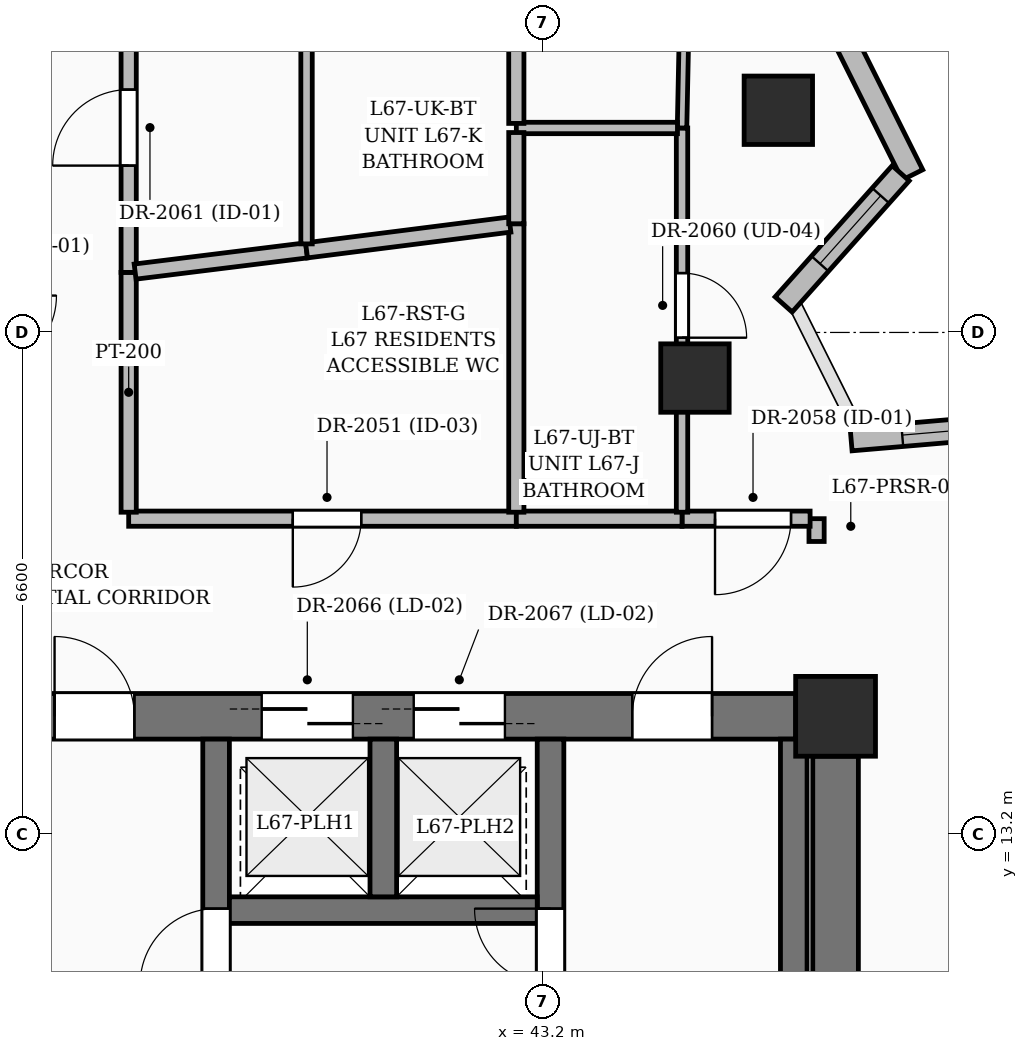
"""IFC4 building model, lengths in metres.
Left out: names, types, materials, properties, quantities, classifications, styles, units other than length and angle.
Written with IfcOpenShell. Run it as: python <this file> out.ifc"""

import sys

from ifc_helpers import new_model, si_unit, direction, frame, frame_2d, origin, origin_2d, place, context, subcontext, project, spatial, rectangle, extrude, element, fill, save


model = new_model("IFC4")
c1 = context("Model", 3, precision=1e-05, world=origin(), true_north=direction((0.0, 1.0)))
c2 = subcontext(c1, "Body", "Model", "MODEL_VIEW")
j1 = project(units=[si_unit("LENGTHUNIT", "METRE"), si_unit("PLANEANGLEUNIT", "RADIAN")], contexts=[c1])
p1 = place(None, origin())
s1 = spatial("IfcSite", under=j1, at=p1, CompositionType="ELEMENT")
p2 = place(p1, origin())
s2 = spatial("IfcBuilding", under=s1, at=p2, CompositionType="ELEMENT")
p3 = place(p2, frame((0.0, 0.0, 259.5)))
s3 = spatial("IfcBuildingStorey", under=s2, at=p3, CompositionType="ELEMENT", Elevation=259.5)
p4 = place(p3, frame((47.05, 14.75, 0.0), z_axis=(0.0, 0.0, 1.0), x_axis=(1.0, 0.0, 0.0)))
e1 = element("IfcColumn", 1, at=p4, inside=s3, PredefinedType="COLUMN", context=c2, shape_type="SweptSolid", body=[
    extrude(rectangle(XDim=1.05, YDim=1.05, at=origin_2d()), origin(), (0.0, 0.0, 1.0), 3.75),
])
p5 = place(p3, frame((45.2, 19.2, 0.0), z_axis=(0.0, 0.0, 1.0), x_axis=(1.0, 0.0, 0.0)))
e2 = element("IfcColumn", 2, at=p5, inside=s3, PredefinedType="COLUMN", context=c2, shape_type="SweptSolid", body=[
    extrude(rectangle(XDim=0.9, YDim=0.9, at=origin_2d()), origin(), (0.0, 0.0, 1.0), 3.75),
])
p6 = place(p3, frame((35.675, 14.75, 0.0), z_axis=(0.0, 0.0, 1.0), x_axis=(1.0, 0.0, 0.0)))
e3 = element("IfcWall", 3, at=p6, inside=s3, PredefinedType="SHEAR", context=c2, shape_type="SweptSolid", body=[
    extrude(rectangle(XDim=10.85, YDim=0.6, at=frame_2d((5.425, 0.0))), origin(), (0.0, 0.0, 1.0), 3.75),
])
p7 = place(p6, frame((1.1, 0.0, 0.0)))
e4 = element("IfcOpeningElement", 4, at=p7, cuts=e3, PredefinedType="OPENING", context=c2, shape_type="SweptSolid", body=[
    extrude(rectangle(XDim=1.05, YDim=2.15, at=frame_2d((0.525, 1.075))), frame((0.0, 0.31, 0.0), z_axis=(0.0, -1.0, 0.0), x_axis=(1.0, 0.0, 0.0)), (0.0, 0.0, 1.0), 0.62),
])
p8 = place(p6, frame((8.7, 0.0, 0.0)))
e5 = element("IfcOpeningElement", 5, at=p8, cuts=e3, PredefinedType="OPENING", context=c2, shape_type="SweptSolid", body=[
    extrude(rectangle(XDim=1.05, YDim=2.15, at=frame_2d((0.525, 1.075))), frame((0.0, 0.31, 0.0), z_axis=(0.0, -1.0, 0.0), x_axis=(1.0, 0.0, 0.0)), (0.0, 0.0, 1.0), 0.62),
])
p9 = place(p6, frame((3.825, 0.0, 0.0)))
e6 = element("IfcOpeningElement", 6, at=p9, cuts=e3, PredefinedType="OPENING", context=c2, shape_type="SweptSolid", body=[
    extrude(rectangle(XDim=1.2, YDim=2.2, at=frame_2d((0.6, 1.1))), frame((0.0, 0.31, 0.0), z_axis=(0.0, -1.0, 0.0), x_axis=(1.0, 0.0, 0.0)), (0.0, 0.0, 1.0), 0.62),
])
p10 = place(p6, frame((5.825, 0.0, 0.0)))
e7 = element("IfcOpeningElement", 7, at=p10, cuts=e3, PredefinedType="OPENING", context=c2, shape_type="SweptSolid", body=[
    extrude(rectangle(XDim=1.2, YDim=2.2, at=frame_2d((0.6, 1.1))), frame((0.0, 0.31, 0.0), z_axis=(0.0, -1.0, 0.0), x_axis=(1.0, 0.0, 0.0)), (0.0, 0.0, 1.0), 0.62),
])
p11 = place(p3, frame((47.05, 5.075, 0.0), z_axis=(0.0, 0.0, 1.0), x_axis=(0.0, 1.0, 0.0)))
e8 = element("IfcWall", 8, at=p11, inside=s3, PredefinedType="SHEAR", context=c2, shape_type="SweptSolid", body=[
    extrude(rectangle(XDim=9.15, YDim=0.6, at=frame_2d((4.575, 0.0))), origin(), (0.0, 0.0, 1.0), 3.75),
])
p12 = place(p3, frame((38.9, 5.2, 0.0), z_axis=(0.0, 0.0, 1.0), x_axis=(0.0, 1.0, 0.0)))
e9 = element("IfcWall", 9, at=p12, inside=s3, PredefinedType="SOLIDWALL", context=c2, shape_type="SweptSolid", body=[
    extrude(rectangle(XDim=9.25, YDim=0.35, at=frame_2d((4.625, 0.0))), origin(), (0.0, 0.0, 1.0), 3.75),
])
p13 = place(p12, frame((6.02, 0.0, 0.0)))
e10 = element("IfcOpeningElement", 10, at=p13, cuts=e9, PredefinedType="OPENING", context=c2, shape_type="SweptSolid", body=[
    extrude(rectangle(XDim=1.0, YDim=2.15, at=frame_2d((0.5, 1.075))), frame((0.0, 0.185, 0.0), z_axis=(0.0, -1.0, 0.0), x_axis=(1.0, 0.0, 0.0)), (0.0, 0.0, 1.0), 0.37),
])
p14 = place(p3, frame((43.3, 5.2, 0.0), z_axis=(0.0, 0.0, 1.0), x_axis=(0.0, 1.0, 0.0)))
e11 = element("IfcWall", 11, at=p14, inside=s3, PredefinedType="SOLIDWALL", context=c2, shape_type="SweptSolid", body=[
    extrude(rectangle(XDim=9.25, YDim=0.35, at=frame_2d((4.625, 0.0))), origin(), (0.0, 0.0, 1.0), 3.75),
])
p15 = place(p14, frame((6.02, 0.0, 0.0)))
e12 = element("IfcOpeningElement", 12, at=p15, cuts=e11, PredefinedType="OPENING", context=c2, shape_type="SweptSolid", body=[
    extrude(rectangle(XDim=1.0, YDim=2.15, at=frame_2d((0.5, 1.075))), frame((0.0, 0.185, 0.0), z_axis=(0.0, -1.0, 0.0), x_axis=(1.0, 0.0, 0.0)), (0.0, 0.0, 1.0), 0.37),
])
p16 = place(p3, frame((46.5, 5.2, 0.0), z_axis=(0.0, 0.0, 1.0), x_axis=(0.0, 1.0, 0.0)))
e13 = element("IfcWall", 13, at=p16, inside=s3, PredefinedType="SOLIDWALL", context=c2, shape_type="SweptSolid", body=[
    extrude(rectangle(XDim=9.25, YDim=0.35, at=frame_2d((4.625, 0.0))), origin(), (0.0, 0.0, 1.0), 3.75),
])
p17 = place(p3, frame((39.075, 12.2, 0.0), z_axis=(0.0, 0.0, 1.0), x_axis=(1.0, 0.0, 0.0)))
e14 = element("IfcWall", 14, at=p17, inside=s3, PredefinedType="SOLIDWALL", context=c2, shape_type="SweptSolid", body=[
    extrude(rectangle(XDim=4.05, YDim=0.35, at=frame_2d((2.025, 0.0))), origin(), (0.0, 0.0, 1.0), 3.75),
])
p18 = place(p3, frame((41.1, 12.375, 0.0), z_axis=(0.0, 0.0, 1.0), x_axis=(0.0, 1.0, 0.0)))
e15 = element("IfcWall", 15, at=p18, inside=s3, PredefinedType="SOLIDWALL", context=c2, shape_type="SweptSolid", body=[
    extrude(rectangle(XDim=2.075, YDim=0.35, at=frame_2d((1.038, 0.0))), origin(), (0.0, 0.0, 1.0), 3.75),
])
p19 = place(p3, frame((46.297, 22.723, 0.0), z_axis=(0.0, 0.0, 1.0), x_axis=(1.0, 0.0, 0.0)))
e16 = element("IfcColumn", 16, at=p19, inside=s3, PredefinedType="COLUMN", context=c2, shape_type="SweptSolid", body=[
    extrude(rectangle(XDim=0.9, YDim=0.9, at=origin_2d()), origin(), (0.0, 0.0, 1.0), 3.75),
])
p20 = place(p3, frame((44.695, 28.611, 0.0), z_axis=(0.0, 0.0, 1.0), x_axis=(0.447161731119, -0.894453121311, 0.0)))
e17 = element("IfcWall", 17, at=p20, inside=s3, PredefinedType="SOLIDWALL", context=c2, shape_type="SweptSolid", body=[
    extrude(rectangle(XDim=7.532, YDim=0.3, at=frame_2d((3.766, 0.0))), origin(), (0.0, 0.0, 1.0), 3.5),
])
p21 = place(p20, frame((3.775, 0.0, 0.6)))
e18 = element("IfcOpeningElement", 18, at=p21, cuts=e17, PredefinedType="OPENING", context=c2, shape_type="SweptSolid", body=[
    extrude(rectangle(XDim=1.5, YDim=2.1, at=frame_2d((0.75, 1.05))), frame((0.0, 0.16, 0.0), z_axis=(0.0, -1.0, 0.0), x_axis=(1.0, 0.0, 0.0)), (0.0, 0.0, 1.0), 0.32),
])
p22 = place(p3, frame((47.907, 21.895, 0.0), z_axis=(0.0, 0.0, 1.0), x_axis=(-0.665751463499, -0.746173564829, 0.0)))
e19 = element("IfcWall", 19, at=p22, inside=s3, PredefinedType="SOLIDWALL", context=c2, shape_type="SweptSolid", body=[
    extrude(rectangle(XDim=2.313, YDim=0.3, at=frame_2d((1.157, 0.0))), origin(), (0.0, 0.0, 1.0), 2.825),
])
p23 = place(p22, frame((0.395, 0.0, 0.8)))
e20 = element("IfcOpeningElement", 20, at=p23, cuts=e19, PredefinedType="OPENING", context=c2, shape_type="SweptSolid", body=[
    extrude(rectangle(XDim=1.2, YDim=1.8, at=frame_2d((0.6, 0.9))), frame((0.0, 0.16, 0.0), z_axis=(0.0, -1.0, 0.0), x_axis=(1.0, 0.0, 0.0)), (0.0, 0.0, 1.0), 0.32),
])
p24 = place(p3, frame((47.254, 18.392, 0.0), z_axis=(0.0, 0.0, 1.0), x_axis=(0.99637564352, 0.085062194895, 0.0)))
e21 = element("IfcWall", 21, at=p24, inside=s3, PredefinedType="SOLIDWALL", context=c2, shape_type="SweptSolid", body=[
    extrude(rectangle(XDim=2.595, YDim=0.3, at=frame_2d((1.297, 0.0))), origin(), (0.0, 0.0, 1.0), 2.825),
])
p25 = place(p24, frame((0.675, 0.0, 0.8)))
e22 = element("IfcOpeningElement", 22, at=p25, cuts=e21, PredefinedType="OPENING", context=c2, shape_type="SweptSolid", body=[
    extrude(rectangle(XDim=1.2, YDim=1.8, at=frame_2d((0.6, 0.9))), frame((0.0, 0.16, 0.0), z_axis=(0.0, -1.0, 0.0), x_axis=(1.0, 0.0, 0.0)), (0.0, 0.0, 1.0), 0.32),
])
p26 = place(p3, frame((42.85, 17.35, 0.0), z_axis=(0.0, 0.0, 1.0), x_axis=(-1.0, 0.0, 0.0)))
e23 = element("IfcWall", 23, at=p26, inside=s3, PredefinedType="PARTITIONING", context=c2, shape_type="SweptSolid", body=[
    extrude(rectangle(XDim=5.1, YDim=0.2, at=frame_2d((2.55, 0.0))), origin(), (0.0, 0.0, 1.0), 3.5),
])
p27 = place(p26, frame((2.041, 0.0, 0.0)))
e24 = element("IfcOpeningElement", 24, at=p27, cuts=e23, PredefinedType="OPENING", context=c2, shape_type="SweptSolid", body=[
    extrude(rectangle(XDim=0.9, YDim=2.1, at=frame_2d((0.45, 1.05))), frame((0.0, 0.11, 0.0), z_axis=(0.0, -1.0, 0.0), x_axis=(1.0, 0.0, 0.0)), (0.0, 0.0, 1.0), 0.22),
])
p28 = place(p3, frame((37.75, 17.435, 0.0), z_axis=(0.0, 0.0, 1.0), x_axis=(0.0, 1.0, 0.0)))
e25 = element("IfcWall", 25, at=p28, inside=s3, PredefinedType="PARTITIONING", context=c2, shape_type="SweptSolid", body=[
    extrude(rectangle(XDim=3.155, YDim=0.2, at=frame_2d((1.578, 0.0))), origin(), (0.0, 0.0, 1.0), 3.5),
])
p29 = place(p3, frame((46.8, 17.05, 0.0), z_axis=(0.0, 0.0, 1.0), x_axis=(0.0, 1.0, 0.0)))
e26 = element("IfcWall", 26, at=p29, inside=s3, PredefinedType="PARTITIONING", context=c2, shape_type="SweptSolid", body=[
    extrude(rectangle(XDim=0.3, YDim=0.2, at=frame_2d((0.15, 0.0))), origin(), (0.0, 0.0, 1.0), 3.5),
])
p30 = place(p3, frame((46.715, 17.35, 0.0), z_axis=(0.0, 0.0, 1.0), x_axis=(-1.0, 0.0, 0.0)))
e27 = element("IfcWall", 27, at=p30, inside=s3, PredefinedType="PARTITIONING", context=c2, shape_type="SweptSolid", body=[
    extrude(rectangle(XDim=1.685, YDim=0.2, at=frame_2d((0.843, 0.0))), origin(), (0.0, 0.0, 1.0), 2.685),
])
p31 = place(p30, frame((0.251, 0.0, 0.0)))
e28 = element("IfcOpeningElement", 28, at=p31, cuts=e27, PredefinedType="OPENING", context=c2, shape_type="SweptSolid", body=[
    extrude(rectangle(XDim=1.0, YDim=2.2, at=frame_2d((0.5, 1.1))), frame((0.0, 0.11, 0.0), z_axis=(0.0, -1.0, 0.0), x_axis=(1.0, 0.0, 0.0)), (0.0, 0.0, 1.0), 0.22),
])
p32 = place(p3, frame((45.03, 17.35, 0.0), z_axis=(0.0, 0.0, 1.0), x_axis=(-1.0, 0.0, 0.0)))
e29 = element("IfcWall", 29, at=p32, inside=s3, PredefinedType="PARTITIONING", context=c2, shape_type="SweptSolid", body=[
    extrude(rectangle(XDim=2.18, YDim=0.2, at=frame_2d((1.09, 0.0))), origin(), (0.0, 0.0, 1.0), 3.5),
])
p33 = place(p3, frame((37.75, 20.59, 0.0), z_axis=(0.0, 0.0, 1.0), x_axis=(0.0, 1.0, 0.0)))
e30 = element("IfcWall", 30, at=p33, inside=s3, PredefinedType="PARTITIONING", context=c2, shape_type="SweptSolid", body=[
    extrude(rectangle(XDim=3.765, YDim=0.2, at=frame_2d((1.882, 0.0))), origin(), (0.0, 0.0, 1.0), 3.5),
])
p34 = place(p33, frame((1.405, 0.0, 0.0)))
e31 = element("IfcOpeningElement", 31, at=p34, cuts=e30, PredefinedType="OPENING", context=c2, shape_type="SweptSolid", body=[
    extrude(rectangle(XDim=1.0, YDim=2.2, at=frame_2d((0.5, 1.1))), frame((0.0, 0.11, 0.0), z_axis=(0.0, -1.0, 0.0), x_axis=(1.0, 0.0, 0.0)), (0.0, 0.0, 1.0), 0.22),
])
p35 = place(p3, frame((42.85, 17.435, 0.0), z_axis=(0.0, 0.0, 1.0), x_axis=(0.0, 1.0, 0.0)))
e32 = element("IfcWall", 32, at=p35, inside=s3, PredefinedType="PARTITIONING", context=c2, shape_type="SweptSolid", body=[
    extrude(rectangle(XDim=3.795, YDim=0.2, at=frame_2d((1.897, 0.0))), origin(), (0.0, 0.0, 1.0), 3.5),
])
p36 = place(p3, frame((40.09, 20.88, 0.0), z_axis=(0.0, 0.0, 1.0), x_axis=(-0.992420982951, -0.122884468503, 0.0)))
e33 = element("IfcWall", 33, at=p36, inside=s3, PredefinedType="PARTITIONING", context=c2, shape_type="SweptSolid", body=[
    extrude(rectangle(XDim=2.273, YDim=0.2, at=frame_2d((1.136, 0.0))), origin(), (0.0, 0.0, 1.0), 3.5),
])
p37 = place(p3, frame((42.766, 21.219, 0.0), z_axis=(0.0, 0.0, 1.0), x_axis=(-0.992052034516, -0.12582829893, 0.0)))
e34 = element("IfcWall", 34, at=p37, inside=s3, PredefinedType="PARTITIONING", context=c2, shape_type="SweptSolid", body=[
    extrude(rectangle(XDim=2.697, YDim=0.2, at=frame_2d((1.349, 0.0))), origin(), (0.0, 0.0, 1.0), 3.5),
])
p38 = place(p3, frame((45.03, 22.49, 0.0), z_axis=(0.0, 0.0, 1.0), x_axis=(0.0, -1.0, 0.0)))
e35 = element("IfcWall", 35, at=p38, inside=s3, PredefinedType="PARTITIONING", context=c2, shape_type="SweptSolid", body=[
    extrude(rectangle(XDim=5.055, YDim=0.15, at=frame_2d((2.527, 0.0))), origin(), (0.0, 0.0, 1.0), 2.685),
])
p39 = place(p38, frame((1.909, 0.0, 0.0)))
e36 = element("IfcOpeningElement", 36, at=p39, cuts=e35, PredefinedType="OPENING", context=c2, shape_type="SweptSolid", body=[
    extrude(rectangle(XDim=0.85, YDim=2.1, at=frame_2d((0.425, 1.05))), frame((0.0, 0.085, 0.0), z_axis=(0.0, -1.0, 0.0), x_axis=(1.0, 0.0, 0.0)), (0.0, 0.0, 1.0), 0.17),
])
p40 = place(p3, frame((45.133, 27.469, 0.0), z_axis=(0.0, 0.0, 1.0), x_axis=(-0.020687931957, -0.999785981834, 0.0)))
e37 = element("IfcWall", 37, at=p40, inside=s3, PredefinedType="PARTITIONING", context=c2, shape_type="SweptSolid", body=[
    extrude(rectangle(XDim=4.98, YDim=0.125, at=frame_2d((2.49, 0.0))), origin(), (0.0, 0.0, 1.0), 2.82),
])
p41 = place(p40, frame((1.876, 0.0, 0.0)))
e38 = element("IfcOpeningElement", 38, at=p41, cuts=e37, PredefinedType="OPENING", context=c2, shape_type="SweptSolid", body=[
    extrude(rectangle(XDim=0.95, YDim=2.2, at=frame_2d((0.475, 1.1))), frame((0.0, 0.072, 0.0), z_axis=(0.0, -1.0, 0.0), x_axis=(1.0, 0.0, 0.0)), (0.0, 0.0, 1.0), 0.145),
])
p42 = place(p3, frame((44.97, 22.49, 0.0), z_axis=(0.0, 0.0, 1.0), x_axis=(-1.0, 0.0, 0.0)))
e39 = element("IfcWall", 39, at=p42, inside=s3, PredefinedType="PARTITIONING", context=c2, shape_type="SweptSolid", body=[
    extrude(rectangle(XDim=2.12, YDim=0.15, at=frame_2d((1.06, 0.0))), origin(), (0.0, 0.0, 1.0), 2.685),
])
p43 = place(p3, frame((42.85, 22.43, 0.0), z_axis=(0.0, 0.0, 1.0), x_axis=(0.0, -1.0, 0.0)))
e40 = element("IfcWall", 40, at=p43, inside=s3, PredefinedType="PARTITIONING", context=c2, shape_type="SweptSolid", body=[
    extrude(rectangle(XDim=1.2, YDim=0.2, at=frame_2d((0.6, 0.0))), origin(), (0.0, 0.0, 1.0), 3.5),
])
p44 = place(p3, frame((42.85, 27.48, 0.0), z_axis=(0.0, 0.0, 1.0), x_axis=(0.0, -1.0, 0.0)))
e41 = element("IfcWall", 41, at=p44, inside=s3, PredefinedType="PARTITIONING", context=c2, shape_type="SweptSolid", body=[
    extrude(rectangle(XDim=4.93, YDim=0.2, at=frame_2d((2.465, 0.0))), origin(), (0.0, 0.0, 1.0), 2.685),
])
p45 = place(p3, frame((40.09, 20.965, 0.0), z_axis=(0.0, 0.0, 1.0), x_axis=(0.0, 1.0, 0.0)))
e42 = element("IfcWall", 42, at=p45, inside=s3, PredefinedType="PARTITIONING", context=c2, shape_type="SweptSolid", body=[
    extrude(rectangle(XDim=6.515, YDim=0.15, at=frame_2d((3.257, 0.0))), origin(), (0.0, 0.0, 1.0), 2.685),
])
p46 = place(p45, frame((2.79, 0.0, 0.0)))
e43 = element("IfcOpeningElement", 43, at=p46, cuts=e42, PredefinedType="OPENING", context=c2, shape_type="SweptSolid", body=[
    extrude(rectangle(XDim=0.85, YDim=2.1, at=frame_2d((0.425, 1.05))), frame((0.0, 0.085, 0.0), z_axis=(0.0, -1.0, 0.0), x_axis=(1.0, 0.0, 0.0)), (0.0, 0.0, 1.0), 0.17),
])
p47 = place(p23, origin())
e44 = element("IfcWindow", 44, at=p47, inside=s3, PartitioningType="SINGLE_PANEL", PredefinedType="WINDOW", context=c2, shape_type="SweptSolid", body=[
    extrude(rectangle(XDim=1.2, YDim=1.8, at=frame_2d((0.6, 0.9))), frame((0.0, 0.03, 0.0), z_axis=(0.0, -1.0, 0.0), x_axis=(1.0, 0.0, 0.0)), (0.0, 0.0, 1.0), 0.06),
])
fill(e20, e44)
p48 = place(p25, origin())
e45 = element("IfcWindow", 45, at=p48, inside=s3, PartitioningType="SINGLE_PANEL", PredefinedType="WINDOW", context=c2, shape_type="SweptSolid", body=[
    extrude(rectangle(XDim=1.2, YDim=1.8, at=frame_2d((0.6, 0.9))), frame((0.0, 0.03, 0.0), z_axis=(0.0, -1.0, 0.0), x_axis=(1.0, 0.0, 0.0)), (0.0, 0.0, 1.0), 0.06),
])
fill(e22, e45)
p49 = place(p7, origin())
e46 = element("IfcDoor", 46, at=p49, inside=s3, OperationType="SINGLE_SWING_LEFT", PredefinedType="DOOR", context=c2, shape_type="SweptSolid", body=[
    extrude(rectangle(XDim=1.05, YDim=2.15, at=frame_2d((0.525, 1.075))), frame((0.0, 0.025, 0.0), z_axis=(0.0, -1.0, 0.0), x_axis=(1.0, 0.0, 0.0)), (0.0, 0.0, 1.0), 0.05),
])
fill(e4, e46)
p50 = place(p8, origin())
e47 = element("IfcDoor", 47, at=p50, inside=s3, OperationType="SINGLE_SWING_RIGHT", PredefinedType="DOOR", context=c2, shape_type="SweptSolid", body=[
    extrude(rectangle(XDim=1.05, YDim=2.15, at=frame_2d((0.525, 1.075))), frame((0.0, 0.025, 0.0), z_axis=(0.0, -1.0, 0.0), x_axis=(1.0, 0.0, 0.0)), (0.0, 0.0, 1.0), 0.05),
])
fill(e5, e47)
p51 = place(p13, origin())
e48 = element("IfcDoor", 48, at=p51, inside=s3, OperationType="SINGLE_SWING_LEFT", PredefinedType="DOOR", context=c2, shape_type="SweptSolid", body=[
    extrude(rectangle(XDim=1.0, YDim=2.15, at=frame_2d((0.5, 1.075))), frame((0.0, 0.025, 0.0), z_axis=(0.0, -1.0, 0.0), x_axis=(1.0, 0.0, 0.0)), (0.0, 0.0, 1.0), 0.05),
])
fill(e10, e48)
p52 = place(p15, origin())
e49 = element("IfcDoor", 49, at=p52, inside=s3, OperationType="SINGLE_SWING_RIGHT", PredefinedType="DOOR", context=c2, shape_type="SweptSolid", body=[
    extrude(rectangle(XDim=1.0, YDim=2.15, at=frame_2d((0.5, 1.075))), frame((0.0, 0.025, 0.0), z_axis=(0.0, -1.0, 0.0), x_axis=(1.0, 0.0, 0.0)), (0.0, 0.0, 1.0), 0.05),
])
fill(e12, e49)
p53 = place(p9, origin())
e50 = element("IfcDoor", 50, at=p53, inside=s3, OperationType="DOUBLE_DOOR_SLIDING", PredefinedType="DOOR", context=c2, shape_type="SweptSolid", body=[
    extrude(rectangle(XDim=1.2, YDim=2.2, at=frame_2d((0.6, 1.1))), frame((0.0, 0.025, 0.0), z_axis=(0.0, -1.0, 0.0), x_axis=(1.0, 0.0, 0.0)), (0.0, 0.0, 1.0), 0.05),
])
fill(e6, e50)
p54 = place(p10, origin())
e51 = element("IfcDoor", 51, at=p54, inside=s3, OperationType="DOUBLE_DOOR_SLIDING", PredefinedType="DOOR", context=c2, shape_type="SweptSolid", body=[
    extrude(rectangle(XDim=1.2, YDim=2.2, at=frame_2d((0.6, 1.1))), frame((0.0, 0.025, 0.0), z_axis=(0.0, -1.0, 0.0), x_axis=(1.0, 0.0, 0.0)), (0.0, 0.0, 1.0), 0.05),
])
fill(e7, e51)
p55 = place(p27, origin())
e52 = element("IfcDoor", 52, at=p55, inside=s3, OperationType="SINGLE_SWING_RIGHT", PredefinedType="DOOR", context=c2, shape_type="SweptSolid", body=[
    extrude(rectangle(XDim=0.9, YDim=2.1, at=frame_2d((0.45, 1.05))), frame((0.0, 0.025, 0.0), z_axis=(0.0, -1.0, 0.0), x_axis=(1.0, 0.0, 0.0)), (0.0, 0.0, 1.0), 0.05),
])
fill(e24, e52)
p56 = place(p31, origin())
e53 = element("IfcDoor", 53, at=p56, inside=s3, OperationType="SINGLE_SWING_RIGHT", PredefinedType="DOOR", context=c2, shape_type="SweptSolid", body=[
    extrude(rectangle(XDim=1.0, YDim=2.2, at=frame_2d((0.5, 1.1))), frame((0.0, 0.025, 0.0), z_axis=(0.0, -1.0, 0.0), x_axis=(1.0, 0.0, 0.0)), (0.0, 0.0, 1.0), 0.05),
])
fill(e28, e53)
p57 = place(p39, origin())
e54 = element("IfcDoor", 54, at=p57, inside=s3, OperationType="SINGLE_SWING_RIGHT", PredefinedType="DOOR", context=c2, shape_type="SweptSolid", body=[
    extrude(rectangle(XDim=0.85, YDim=2.1, at=frame_2d((0.425, 1.05))), frame((0.0, 0.025, 0.0), z_axis=(0.0, -1.0, 0.0), x_axis=(1.0, 0.0, 0.0)), (0.0, 0.0, 1.0), 0.05),
])
fill(e36, e54)
p58 = place(p34, origin())
e55 = element("IfcDoor", 55, at=p58, inside=s3, OperationType="SINGLE_SWING_LEFT", PredefinedType="DOOR", context=c2, shape_type="SweptSolid", body=[
    extrude(rectangle(XDim=1.0, YDim=2.2, at=frame_2d((0.5, 1.1))), frame((0.0, 0.025, 0.0), z_axis=(0.0, -1.0, 0.0), x_axis=(1.0, 0.0, 0.0)), (0.0, 0.0, 1.0), 0.05),
])
fill(e31, e55)
save(model, sys.argv[1])
